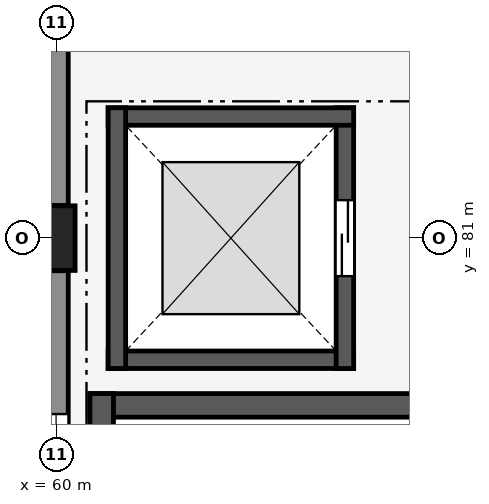
"""IFC4 building model, lengths in metres.
Left out: names, types, materials, properties, quantities, classifications, styles, units other than length and angle.
Written with IfcOpenShell. Run it as: python <this file> out.ifc"""

import sys

from ifc_helpers import new_model, si_unit, direction, frame, frame_2d, origin, origin_2d, place, context, subcontext, project, spatial, rectangle, extrude, element, fill, save


model = new_model("IFC4")
c1 = context("Model", 3, precision=1e-05, world=origin(), true_north=direction((0.0, 1.0)))
c2 = subcontext(c1, "Body", "Model", "MODEL_VIEW")
j1 = project(units=[si_unit("LENGTHUNIT", "METRE"), si_unit("PLANEANGLEUNIT", "RADIAN")], contexts=[c1])
p1 = place(None, origin())
s1 = spatial("IfcSite", under=j1, at=p1, CompositionType="ELEMENT")
p2 = place(p1, origin())
s2 = spatial("IfcBuilding", under=s1, at=p2, CompositionType="ELEMENT")
p3 = place(p2, origin())
s3 = spatial("IfcBuildingStorey", under=s2, at=p3, CompositionType="ELEMENT", Elevation=0.0)
p4 = place(p3, frame((60.0, 81.0, 0.0), z_axis=(0.0, 0.0, 1.0), x_axis=(1.0, 0.0, 0.0)))
e1 = element("IfcColumn", 1, at=p4, inside=s3, PredefinedType="COLUMN", context=c2, shape_type="SweptSolid", body=[
    extrude(rectangle(XDim=0.5, YDim=0.85, at=origin_2d()), origin(), (0.0, 0.0, 1.0), 4.8),
])
p5 = place(p3, frame((60.0, 75.0, 0.0), z_axis=(0.0, 0.0, 1.0), x_axis=(0.0, 1.0, 0.0)))
e2 = element("IfcWall", 2, at=p5, inside=s3, PredefinedType="SOLIDWALL", context=c2, shape_type="SweptSolid", body=[
    extrude(rectangle(XDim=5.571, YDim=0.32, at=frame_2d((2.786, 0.0))), origin(), (0.0, 0.0, 1.0), 3.69),
])
p6 = place(p5, frame((1.885, 0.0, 1.1)))
e3 = element("IfcOpeningElement", 3, at=p6, cuts=e2, PredefinedType="OPENING", context=c2, shape_type="SweptSolid", body=[
    extrude(rectangle(XDim=1.8, YDim=1.2, at=frame_2d((0.9, 0.6))), frame((0.0, 0.17, 0.0), z_axis=(0.0, -1.0, 0.0), x_axis=(1.0, 0.0, 0.0)), (0.0, 0.0, 1.0), 0.34),
])
p7 = place(p3, frame((60.0, 81.429, 0.0), z_axis=(0.0, 0.0, 1.0), x_axis=(0.0, 1.0, 0.0)))
e4 = element("IfcWall", 4, at=p7, inside=s3, PredefinedType="SOLIDWALL", context=c2, shape_type="SweptSolid", body=[
    extrude(rectangle(XDim=5.192, YDim=0.32, at=frame_2d((2.596, 0.0))), origin(), (0.0, 0.0, 1.0), 4.166),
])
p8 = place(p3, frame((65.255, 78.8, 0.0), z_axis=(0.0, 0.0, 1.0), x_axis=(-1.0, 0.0, 0.0)))
e5 = element("IfcWall", 5, at=p8, inside=s3, PredefinedType="SHEAR", context=c2, shape_type="SweptSolid", body=[
    extrude(rectangle(XDim=4.81, YDim=0.31, at=frame_2d((2.405, 0.0))), origin(), (0.0, 0.0, 1.0), 4.66),
])
p9 = place(p3, frame((60.6, 78.955, 0.0), z_axis=(0.0, 0.0, 1.0), x_axis=(0.0, -1.0, 0.0)))
e6 = element("IfcWall", 6, at=p9, inside=s3, PredefinedType="SHEAR", context=c2, shape_type="SweptSolid", body=[
    extrude(rectangle(XDim=9.61, YDim=0.31, at=frame_2d((4.805, 0.0))), origin(), (0.0, 0.0, 1.0), 4.66),
])
p10 = place(p3, frame((60.685, 79.4, 0.0), z_axis=(0.0, 0.0, 1.0), x_axis=(1.0, 0.0, 0.0)))
e7 = element("IfcWall", 7, at=p10, inside=s3, PredefinedType="SHEAR", context=c2, shape_type="SweptSolid", body=[
    extrude(rectangle(XDim=3.23, YDim=0.23, at=frame_2d((1.615, 0.0))), origin(), (0.0, 0.0, 1.0), 4.8),
])
p11 = place(p3, frame((63.8, 79.285, 0.0), z_axis=(0.0, 0.0, 1.0), x_axis=(0.0, 1.0, 0.0)))
e8 = element("IfcWall", 8, at=p11, inside=s3, PredefinedType="SHEAR", context=c2, shape_type="SweptSolid", body=[
    extrude(rectangle(XDim=3.43, YDim=0.23, at=frame_2d((1.715, 0.0))), origin(), (0.0, 0.0, 1.0), 4.8),
])
p12 = place(p11, frame((1.215, 0.0, 0.0)))
e9 = element("IfcOpeningElement", 9, at=p12, cuts=e8, PredefinedType="OPENING", context=c2, shape_type="SweptSolid", body=[
    extrude(rectangle(XDim=1.0, YDim=2.15, at=frame_2d((0.5, 1.075))), frame((0.0, 0.125, 0.0), z_axis=(0.0, -1.0, 0.0), x_axis=(1.0, 0.0, 0.0)), (0.0, 0.0, 1.0), 0.25),
])
p13 = place(p3, frame((63.915, 82.6, 0.0), z_axis=(0.0, 0.0, 1.0), x_axis=(-1.0, 0.0, 0.0)))
e10 = element("IfcWall", 10, at=p13, inside=s3, PredefinedType="SHEAR", context=c2, shape_type="SweptSolid", body=[
    extrude(rectangle(XDim=3.23, YDim=0.23, at=frame_2d((1.615, 0.0))), origin(), (0.0, 0.0, 1.0), 4.8),
])
p14 = place(p3, frame((60.8, 82.715, 0.0), z_axis=(0.0, 0.0, 1.0), x_axis=(0.0, -1.0, 0.0)))
e11 = element("IfcWall", 11, at=p14, inside=s3, PredefinedType="SHEAR", context=c2, shape_type="SweptSolid", body=[
    extrude(rectangle(XDim=3.43, YDim=0.23, at=frame_2d((1.715, 0.0))), origin(), (0.0, 0.0, 1.0), 4.8),
])
p15 = place(p6, origin())
e12 = element("IfcWindow", 12, at=p15, inside=s3, PartitioningType="SINGLE_PANEL", PredefinedType="WINDOW", context=c2, shape_type="SweptSolid", body=[
    extrude(rectangle(XDim=1.8, YDim=1.2, at=frame_2d((0.9, 0.6))), frame((0.0, 0.03, 0.0), z_axis=(0.0, -1.0, 0.0), x_axis=(1.0, 0.0, 0.0)), (0.0, 0.0, 1.0), 0.06),
])
fill(e3, e12)
p16 = place(p12, origin())
e13 = element("IfcDoor", 13, at=p16, inside=s3, OperationType="SLIDING_TO_LEFT", PredefinedType="DOOR", context=c2, shape_type="SweptSolid", body=[
    extrude(rectangle(XDim=1.0, YDim=2.15, at=frame_2d((0.5, 1.075))), frame((0.0, 0.025, 0.0), z_axis=(0.0, -1.0, 0.0), x_axis=(1.0, 0.0, 0.0)), (0.0, 0.0, 1.0), 0.05),
])
fill(e9, e13)
save(model, sys.argv[1])
